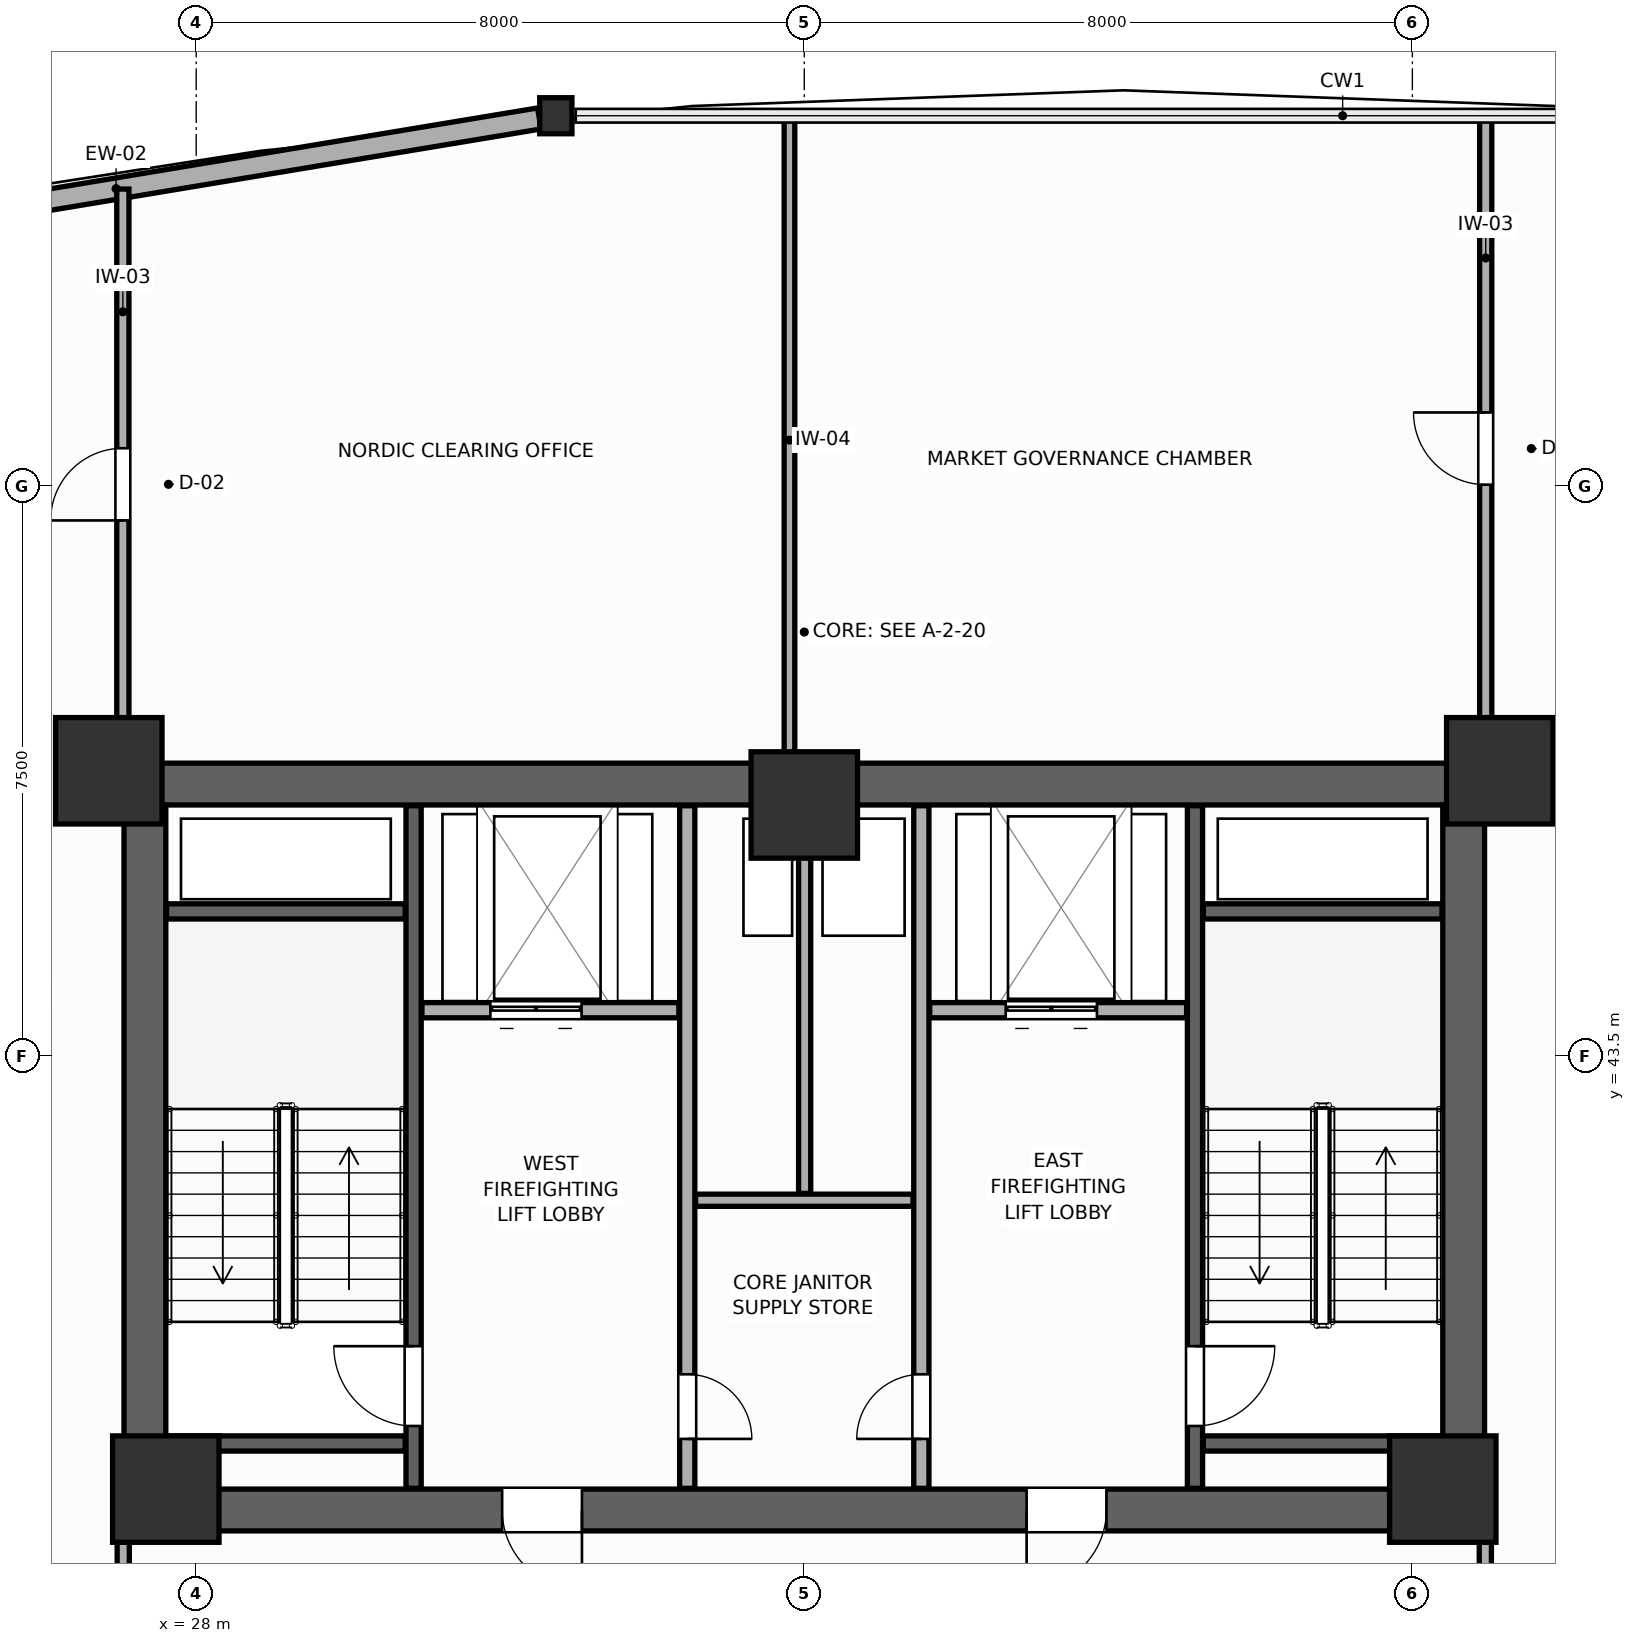
"""IFC4 building model, lengths in metres.
Left out: names, types, materials, properties, quantities, classifications, styles, units other than length and angle.
Written with IfcOpenShell. Run it as: python <this file> out.ifc"""

import sys

from ifc_helpers import new_model, si_unit, direction, frame, frame_2d, origin, origin_2d, place, context, subcontext, project, spatial, rectangle, i_section, extrude, source, transform, mapped, element, fill, save


model = new_model("IFC4")
c1 = context("Model", 3, precision=1e-05, world=origin(), true_north=direction((0.0, 1.0)))
c2 = subcontext(c1, "Body", "Model", "MODEL_VIEW")
j1 = project(units=[si_unit("LENGTHUNIT", "METRE"), si_unit("PLANEANGLEUNIT", "RADIAN")], contexts=[c1])
p1 = place(None, origin())
s1 = spatial("IfcSite", under=j1, at=p1, CompositionType="ELEMENT")
p2 = place(p1, origin())
s2 = spatial("IfcBuilding", under=s1, at=p2, CompositionType="ELEMENT")
p3 = place(p2, frame((0.0, 0.0, 75.6)))
s3 = spatial("IfcBuildingStorey", under=s2, at=p3, CompositionType="ELEMENT", Elevation=75.6)
p4 = place(p3, frame((27.05, 47.075, 0.0), z_axis=(0.0, 0.0, 1.0), x_axis=(1.0, 0.0, 0.0)))
e1 = element("IfcWall", 1, at=p4, inside=s3, PredefinedType="SHEAR", context=c2, shape_type="SweptSolid", body=[
    extrude(rectangle(XDim=17.9, YDim=0.55, at=frame_2d((8.95, 0.0))), origin(), (0.0, 0.0, 1.0), 3.9),
])
p5 = place(p3, frame((27.05, 37.525, 0.0), z_axis=(0.0, 0.0, 1.0), x_axis=(1.0, 0.0, 0.0)))
e2 = element("IfcWall", 2, at=p5, inside=s3, PredefinedType="SHEAR", context=c2, shape_type="SweptSolid", body=[
    extrude(rectangle(XDim=17.9, YDim=0.55, at=frame_2d((8.95, 0.0))), origin(), (0.0, 0.0, 1.0), 3.9),
])
p6 = place(p5, frame((4.975, 0.0, 0.0)))
e3 = element("IfcOpeningElement", 3, at=p6, cuts=e2, PredefinedType="OPENING", context=c2, shape_type="SweptSolid", body=[
    extrude(rectangle(XDim=1.05, YDim=2.1, at=frame_2d((0.525, 1.05))), frame((0.0, 0.285, 0.0), z_axis=(0.0, -1.0, 0.0), x_axis=(1.0, 0.0, 0.0)), (0.0, 0.0, 1.0), 0.57),
])
p7 = place(p5, frame((11.875, 0.0, 0.0)))
e4 = element("IfcOpeningElement", 4, at=p7, cuts=e2, PredefinedType="OPENING", context=c2, shape_type="SweptSolid", body=[
    extrude(rectangle(XDim=1.05, YDim=2.1, at=frame_2d((0.525, 1.05))), frame((0.0, 0.285, 0.0), z_axis=(0.0, -1.0, 0.0), x_axis=(1.0, 0.0, 0.0)), (0.0, 0.0, 1.0), 0.57),
])
for number, where, z_axis, x_axis in (
    (5, (27.325, 37.8, 0.0), (0.0, 0.0, 1.0), (0.0, 1.0, 0.0)),
    (6, (44.675, 37.8, 0.0), (0.0, 0.0, 1.0), (0.0, 1.0, 0.0)),
):
    element("IfcWall", number, at=place(p3, frame(where, z_axis=z_axis, x_axis=x_axis)), inside=s3, PredefinedType="SHEAR", context=c2, shape_type="SweptSolid", body=[
        extrude(rectangle(XDim=9.0, YDim=0.55, at=frame_2d((4.5, 0.0))), origin(), (0.0, 0.0, 1.0), 3.9),
    ])
m1 = source(origin(), c2, "Body", "SweptSolid", [
    extrude(rectangle(XDim=1.4, YDim=1.4, at=origin_2d()), origin(), (0.0, 0.0, 1.0), 3.9),
])
for number, where, z_axis, x_axis in (
    (7, (26.85, 47.25, 0.0), (0.0, 0.0, 1.0), (1.0, 0.0, 0.0)),
    (8, (45.15, 47.25, 0.0), (0.0, 0.0, 1.0), (1.0, 0.0, 0.0)),
    (9, (27.6, 37.8, 0.0), (0.0, 0.0, 1.0), (1.0, 0.0, 0.0)),
    (10, (44.4, 37.8, 0.0), (0.0, 0.0, 1.0), (1.0, 0.0, 0.0)),
    (11, (36.0, 46.8, 0.0), (0.0, 0.0, 1.0), (1.0, 0.0, 0.0)),
):
    element("IfcColumn", number, at=place(p3, frame(where, z_axis=z_axis, x_axis=x_axis)), inside=s3, PredefinedType="COLUMN", context=c2, shape_type="MappedRepresentation", body=[
        mapped(m1, transform((0.0, 0.0, 0.0), scale=1.0)),
    ])
m2 = source(origin(), c2, "Body", "SweptSolid", [
    extrude(i_section(OverallWidth=0.424, OverallDepth=0.474, WebThickness=0.045, FlangeThickness=0.072, FilletRadius=0.015, at=origin_2d()), origin(), (0.0, 0.0, 1.0), 3.9),
])
p8 = place(p3, frame((32.731, 55.868, 0.0), z_axis=(0.0, 0.0, 1.0), x_axis=(1.0, 0.0, 0.0)))
e12 = element("IfcColumn", 12, at=p8, inside=s3, PredefinedType="COLUMN", context=c2, shape_type="MappedRepresentation", body=[
    mapped(m2, transform((0.0, 0.0, 0.0), scale=1.0)),
])
p9 = place(p3, frame((32.514, 55.832, 0.0), z_axis=(0.0, 0.0, 1.0), x_axis=(-0.986523610756, -0.163618964122, 0.0)))
e13 = element("IfcWall", 13, at=p9, inside=s3, PredefinedType="SOLIDWALL", context=c2, shape_type="SweptSolid", body=[
    extrude(rectangle(XDim=17.258, YDim=0.28, at=frame_2d((8.629, 0.0))), origin(), (0.0, 0.0, 1.0), 3.23),
])
p10 = place(p9, frame((11.469, 0.0, 0.75)))
e14 = element("IfcOpeningElement", 14, at=p10, cuts=e13, PredefinedType="OPENING", context=c2, shape_type="SweptSolid", body=[
    extrude(rectangle(XDim=1.7, YDim=1.75, at=frame_2d((0.85, 0.875))), frame((0.0, 0.15, 0.0), z_axis=(0.0, -1.0, 0.0), x_axis=(1.0, 0.0, 0.0)), (0.0, 0.0, 1.0), 0.3),
])
p11 = place(p3, frame((30.86, 37.81, 0.0), z_axis=(0.0, 0.0, 1.0), x_axis=(0.0, 1.0, 0.0)))
e15 = element("IfcWall", 15, at=p11, inside=s3, PredefinedType="SHEAR", context=c2, shape_type="SweptSolid", body=[
    extrude(rectangle(XDim=8.98, YDim=0.2, at=frame_2d((4.49, 0.0))), origin(), (0.0, 0.0, 1.0), 3.9),
])
p12 = place(p11, frame((0.82, 0.0, 0.0)))
e16 = element("IfcOpeningElement", 16, at=p12, cuts=e15, PredefinedType="OPENING", context=c2, shape_type="SweptSolid", body=[
    extrude(rectangle(XDim=1.05, YDim=2.1, at=frame_2d((0.525, 1.05))), frame((0.0, 0.11, 0.0), z_axis=(0.0, -1.0, 0.0), x_axis=(1.0, 0.0, 0.0)), (0.0, 0.0, 1.0), 0.22),
])
for number, where, z_axis, x_axis in (
    (17, (27.61, 45.4, 0.0), (0.0, 0.0, 1.0), (1.0, 0.0, 0.0)),
    (18, (27.61, 38.4, 0.0), (0.0, 0.0, 1.0), (1.0, 0.0, 0.0)),
):
    element("IfcWall", number, at=place(p3, frame(where, z_axis=z_axis, x_axis=x_axis)), inside=s3, PredefinedType="SHEAR", context=c2, shape_type="SweptSolid", body=[
        extrude(rectangle(XDim=3.14, YDim=0.2, at=frame_2d((1.57, 0.0))), origin(), (0.0, 0.0, 1.0), 3.9),
    ])
p13 = place(p3, frame((41.14, 37.81, 0.0), z_axis=(0.0, 0.0, 1.0), x_axis=(0.0, 1.0, 0.0)))
e19 = element("IfcWall", 19, at=p13, inside=s3, PredefinedType="SHEAR", context=c2, shape_type="SweptSolid", body=[
    extrude(rectangle(XDim=8.98, YDim=0.2, at=frame_2d((4.49, 0.0))), origin(), (0.0, 0.0, 1.0), 3.9),
])
p14 = place(p13, frame((0.82, 0.0, 0.0)))
e20 = element("IfcOpeningElement", 20, at=p14, cuts=e19, PredefinedType="OPENING", context=c2, shape_type="SweptSolid", body=[
    extrude(rectangle(XDim=1.05, YDim=2.1, at=frame_2d((0.525, 1.05))), frame((0.0, 0.11, 0.0), z_axis=(0.0, -1.0, 0.0), x_axis=(1.0, 0.0, 0.0)), (0.0, 0.0, 1.0), 0.22),
])
for number, where, z_axis, x_axis in (
    (21, (41.25, 45.4, 0.0), (0.0, 0.0, 1.0), (1.0, 0.0, 0.0)),
    (22, (41.25, 38.4, 0.0), (0.0, 0.0, 1.0), (1.0, 0.0, 0.0)),
):
    element("IfcWall", number, at=place(p3, frame(where, z_axis=z_axis, x_axis=x_axis)), inside=s3, PredefinedType="SHEAR", context=c2, shape_type="SweptSolid", body=[
        extrude(rectangle(XDim=3.14, YDim=0.2, at=frame_2d((1.57, 0.0))), origin(), (0.0, 0.0, 1.0), 3.9),
    ])
p15 = place(p3, frame((30.97, 44.1, 0.0), z_axis=(0.0, 0.0, 1.0), x_axis=(1.0, 0.0, 0.0)))
e23 = element("IfcWall", 23, at=p15, inside=s3, PredefinedType="PARTITIONING", context=c2, shape_type="SweptSolid", body=[
    extrude(rectangle(XDim=3.38, YDim=0.2, at=frame_2d((1.69, 0.0))), origin(), (0.0, 0.0, 1.0), 3.68),
])
p16 = place(p15, frame((0.9, 0.0, 0.0)))
e24 = element("IfcOpeningElement", 24, at=p16, cuts=e23, PredefinedType="OPENING", context=c2, shape_type="SweptSolid", body=[
    extrude(rectangle(XDim=1.2, YDim=2.1, at=frame_2d((0.6, 1.05))), frame((0.0, 0.11, 0.0), z_axis=(0.0, -1.0, 0.0), x_axis=(1.0, 0.0, 0.0)), (0.0, 0.0, 1.0), 0.22),
])
p17 = place(p3, frame((37.65, 44.1, 0.0), z_axis=(0.0, 0.0, 1.0), x_axis=(1.0, 0.0, 0.0)))
e25 = element("IfcWall", 25, at=p17, inside=s3, PredefinedType="PARTITIONING", context=c2, shape_type="SweptSolid", body=[
    extrude(rectangle(XDim=3.38, YDim=0.2, at=frame_2d((1.69, 0.0))), origin(), (0.0, 0.0, 1.0), 3.68),
])
p18 = place(p17, frame((1.0, 0.0, 0.0)))
e26 = element("IfcOpeningElement", 26, at=p18, cuts=e25, PredefinedType="OPENING", context=c2, shape_type="SweptSolid", body=[
    extrude(rectangle(XDim=1.2, YDim=2.1, at=frame_2d((0.6, 1.05))), frame((0.0, 0.11, 0.0), z_axis=(0.0, -1.0, 0.0), x_axis=(1.0, 0.0, 0.0)), (0.0, 0.0, 1.0), 0.22),
])
p19 = place(p3, frame((34.46, 37.81, 0.0), z_axis=(0.0, 0.0, 1.0), x_axis=(0.0, 1.0, 0.0)))
e27 = element("IfcWall", 27, at=p19, inside=s3, PredefinedType="PARTITIONING", context=c2, shape_type="SweptSolid", body=[
    extrude(rectangle(XDim=8.98, YDim=0.2, at=frame_2d((4.49, 0.0))), origin(), (0.0, 0.0, 1.0), 3.68),
])
p20 = place(p19, frame((0.65, 0.0, 0.0)))
e28 = element("IfcOpeningElement", 28, at=p20, cuts=e27, PredefinedType="OPENING", context=c2, shape_type="SweptSolid", body=[
    extrude(rectangle(XDim=0.85, YDim=2.05, at=frame_2d((0.425, 1.025))), frame((0.0, 0.11, 0.0), z_axis=(0.0, -1.0, 0.0), x_axis=(1.0, 0.0, 0.0)), (0.0, 0.0, 1.0), 0.22),
])
p21 = place(p3, frame((37.54, 37.81, 0.0), z_axis=(0.0, 0.0, 1.0), x_axis=(0.0, 1.0, 0.0)))
e29 = element("IfcWall", 29, at=p21, inside=s3, PredefinedType="PARTITIONING", context=c2, shape_type="SweptSolid", body=[
    extrude(rectangle(XDim=8.98, YDim=0.2, at=frame_2d((4.49, 0.0))), origin(), (0.0, 0.0, 1.0), 3.68),
])
p22 = place(p21, frame((0.65, 0.0, 0.0)))
e30 = element("IfcOpeningElement", 30, at=p22, cuts=e29, PredefinedType="OPENING", context=c2, shape_type="SweptSolid", body=[
    extrude(rectangle(XDim=0.85, YDim=2.05, at=frame_2d((0.425, 1.025))), frame((0.0, 0.11, 0.0), z_axis=(0.0, -1.0, 0.0), x_axis=(1.0, 0.0, 0.0)), (0.0, 0.0, 1.0), 0.22),
])
p23 = place(p3, frame((34.57, 41.6, 0.0), z_axis=(0.0, 0.0, 1.0), x_axis=(1.0, 0.0, 0.0)))
e31 = element("IfcWall", 31, at=p23, inside=s3, PredefinedType="PARTITIONING", context=c2, shape_type="SweptSolid", body=[
    extrude(rectangle(XDim=2.86, YDim=0.16, at=frame_2d((1.43, 0.0))), origin(), (0.0, 0.0, 1.0), 3.68),
])
p24 = place(p3, frame((36.005, 41.69, 0.0), z_axis=(0.0, 0.0, 1.0), x_axis=(0.0, 1.0, 0.0)))
e32 = element("IfcWall", 32, at=p24, inside=s3, PredefinedType="PARTITIONING", context=c2, shape_type="SweptSolid", body=[
    extrude(rectangle(XDim=5.1, YDim=0.16, at=frame_2d((2.55, 0.0))), origin(), (0.0, 0.0, 1.0), 3.68),
])
p25 = place(p3, frame((27.04, 35.0, 0.0), z_axis=(0.0, 0.0, 1.0), x_axis=(0.0, 1.0, 0.0)))
e33 = element("IfcWall", 33, at=p25, inside=s3, PredefinedType="PARTITIONING", context=c2, shape_type="SweptSolid", body=[
    extrude(rectangle(XDim=2.65, YDim=0.16, at=frame_2d((1.325, 0.0))), origin(), (0.0, 0.0, 1.0), 3.68),
])
p26 = place(p25, frame((0.75, 0.0, 0.0)))
e34 = element("IfcOpeningElement", 34, at=p26, cuts=e33, PredefinedType="OPENING", context=c2, shape_type="SweptSolid", body=[
    extrude(rectangle(XDim=1.05, YDim=2.1, at=frame_2d((0.525, 1.05))), frame((0.0, 0.09, 0.0), z_axis=(0.0, -1.0, 0.0), x_axis=(1.0, 0.0, 0.0)), (0.0, 0.0, 1.0), 0.18),
])
p27 = place(p3, frame((44.96, 35.0, 0.0), z_axis=(0.0, 0.0, 1.0), x_axis=(0.0, 1.0, 0.0)))
e35 = element("IfcWall", 35, at=p27, inside=s3, PredefinedType="PARTITIONING", context=c2, shape_type="SweptSolid", body=[
    extrude(rectangle(XDim=2.65, YDim=0.16, at=frame_2d((1.325, 0.0))), origin(), (0.0, 0.0, 1.0), 3.68),
])
p28 = place(p27, frame((0.75, 0.0, 0.0)))
e36 = element("IfcOpeningElement", 36, at=p28, cuts=e35, PredefinedType="OPENING", context=c2, shape_type="SweptSolid", body=[
    extrude(rectangle(XDim=1.05, YDim=2.1, at=frame_2d((0.525, 1.05))), frame((0.0, 0.09, 0.0), z_axis=(0.0, -1.0, 0.0), x_axis=(1.0, 0.0, 0.0)), (0.0, 0.0, 1.0), 0.18),
])
p29 = place(p3, frame((44.965, 47.34, 0.0), z_axis=(0.0, 0.0, 1.0), x_axis=(0.0, 1.0, 0.0)))
e37 = element("IfcWall", 37, at=p29, inside=s3, PredefinedType="PARTITIONING", context=c2, shape_type="SweptSolid", body=[
    extrude(rectangle(XDim=8.508, YDim=0.16, at=frame_2d((4.254, 0.0))), origin(), (0.0, 0.0, 1.0), 3.68),
])
p30 = place(p29, frame((3.674, 0.0, 0.0)))
e38 = element("IfcOpeningElement", 38, at=p30, cuts=e37, PredefinedType="OPENING", context=c2, shape_type="SweptSolid", body=[
    extrude(rectangle(XDim=0.95, YDim=2.05, at=frame_2d((0.475, 1.025))), frame((0.0, 0.09, 0.0), z_axis=(0.0, -1.0, 0.0), x_axis=(1.0, 0.0, 0.0)), (0.0, 0.0, 1.0), 0.18),
])
p31 = place(p3, frame((27.035, 47.34, 0.0), z_axis=(0.0, 0.0, 1.0), x_axis=(0.0, 1.0, 0.0)))
e39 = element("IfcWall", 39, at=p31, inside=s3, PredefinedType="PARTITIONING", context=c2, shape_type="SweptSolid", body=[
    extrude(rectangle(XDim=7.563, YDim=0.16, at=frame_2d((3.781, 0.0))), origin(), (0.0, 0.0, 1.0), 3.68),
])
p32 = place(p31, frame((3.204, 0.0, 0.0)))
e40 = element("IfcOpeningElement", 40, at=p32, cuts=e39, PredefinedType="OPENING", context=c2, shape_type="SweptSolid", body=[
    extrude(rectangle(XDim=0.95, YDim=2.05, at=frame_2d((0.475, 1.025))), frame((0.0, 0.09, 0.0), z_axis=(0.0, -1.0, 0.0), x_axis=(1.0, 0.0, 0.0)), (0.0, 0.0, 1.0), 0.18),
])
p33 = place(p3, frame((35.805, 47.352, 0.0), z_axis=(0.0, 0.0, 1.0), x_axis=(0.0, 1.0, 0.0)))
e41 = element("IfcWall", 41, at=p33, inside=s3, PredefinedType="PARTITIONING", context=c2, shape_type="SweptSolid", body=[
    extrude(rectangle(XDim=8.496, YDim=0.14, at=frame_2d((4.248, 0.0))), origin(), (0.0, 0.0, 1.0), 3.68),
])
p34 = place(p12, origin())
e42 = element("IfcDoor", 42, at=p34, inside=s3, OperationType="SINGLE_SWING_RIGHT", PredefinedType="DOOR", context=c2, shape_type="SweptSolid", body=[
    extrude(rectangle(XDim=1.05, YDim=2.1, at=frame_2d((0.525, 1.05))), frame((0.0, 0.025, 0.0), z_axis=(0.0, -1.0, 0.0), x_axis=(1.0, 0.0, 0.0)), (0.0, 0.0, 1.0), 0.05),
])
fill(e16, e42)
p35 = place(p14, frame((1.05, 0.0, 0.0), z_axis=(0.0, 0.0, 1.0), x_axis=(-1.0, 0.0, 0.0)))
e43 = element("IfcDoor", 43, at=p35, inside=s3, OperationType="SINGLE_SWING_LEFT", PredefinedType="DOOR", context=c2, shape_type="SweptSolid", body=[
    extrude(rectangle(XDim=1.05, YDim=2.1, at=frame_2d((0.525, 1.05))), frame((0.0, 0.025, 0.0), z_axis=(0.0, -1.0, 0.0), x_axis=(1.0, 0.0, 0.0)), (0.0, 0.0, 1.0), 0.05),
])
fill(e20, e43)
p36 = place(p16, origin())
e44 = element("IfcDoor", 44, at=p36, inside=s3, OperationType="DOUBLE_DOOR_SLIDING", PredefinedType="DOOR", context=c2, shape_type="SweptSolid", body=[
    extrude(rectangle(XDim=1.2, YDim=2.1, at=frame_2d((0.6, 1.05))), frame((0.0, 0.025, 0.0), z_axis=(0.0, -1.0, 0.0), x_axis=(1.0, 0.0, 0.0)), (0.0, 0.0, 1.0), 0.05),
])
fill(e24, e44)
p37 = place(p18, origin())
e45 = element("IfcDoor", 45, at=p37, inside=s3, OperationType="DOUBLE_DOOR_SLIDING", PredefinedType="DOOR", context=c2, shape_type="SweptSolid", body=[
    extrude(rectangle(XDim=1.2, YDim=2.1, at=frame_2d((0.6, 1.05))), frame((0.0, 0.025, 0.0), z_axis=(0.0, -1.0, 0.0), x_axis=(1.0, 0.0, 0.0)), (0.0, 0.0, 1.0), 0.05),
])
fill(e26, e45)
p38 = place(p20, frame((0.85, 0.0, 0.0), z_axis=(0.0, 0.0, 1.0), x_axis=(-1.0, 0.0, 0.0)))
e46 = element("IfcDoor", 46, at=p38, inside=s3, OperationType="SINGLE_SWING_RIGHT", PredefinedType="DOOR", context=c2, shape_type="SweptSolid", body=[
    extrude(rectangle(XDim=0.85, YDim=2.05, at=frame_2d((0.425, 1.025))), frame((0.0, 0.025, 0.0), z_axis=(0.0, -1.0, 0.0), x_axis=(1.0, 0.0, 0.0)), (0.0, 0.0, 1.0), 0.05),
])
fill(e28, e46)
p39 = place(p22, origin())
e47 = element("IfcDoor", 47, at=p39, inside=s3, OperationType="SINGLE_SWING_LEFT", PredefinedType="DOOR", context=c2, shape_type="SweptSolid", body=[
    extrude(rectangle(XDim=0.85, YDim=2.05, at=frame_2d((0.425, 1.025))), frame((0.0, 0.025, 0.0), z_axis=(0.0, -1.0, 0.0), x_axis=(1.0, 0.0, 0.0)), (0.0, 0.0, 1.0), 0.05),
])
fill(e30, e47)
p40 = place(p30, origin())
e48 = element("IfcDoor", 48, at=p40, inside=s3, OperationType="SINGLE_SWING_RIGHT", PredefinedType="DOOR", context=c2, shape_type="SweptSolid", body=[
    extrude(rectangle(XDim=0.95, YDim=2.05, at=frame_2d((0.475, 1.025))), frame((0.0, 0.025, 0.0), z_axis=(0.0, -1.0, 0.0), x_axis=(1.0, 0.0, 0.0)), (0.0, 0.0, 1.0), 0.05),
])
fill(e38, e48)
p41 = place(p32, origin())
e49 = element("IfcDoor", 49, at=p41, inside=s3, OperationType="SINGLE_SWING_LEFT", PredefinedType="DOOR", context=c2, shape_type="SweptSolid", body=[
    extrude(rectangle(XDim=0.95, YDim=2.05, at=frame_2d((0.475, 1.025))), frame((0.0, 0.025, 0.0), z_axis=(0.0, -1.0, 0.0), x_axis=(1.0, 0.0, 0.0)), (0.0, 0.0, 1.0), 0.05),
])
fill(e40, e49)
p42 = place(p6, frame((1.05, 0.0, 0.0), z_axis=(0.0, 0.0, 1.0), x_axis=(-1.0, 0.0, 0.0)))
e50 = element("IfcDoor", 50, at=p42, inside=s3, OperationType="SINGLE_SWING_LEFT", PredefinedType="DOOR", context=c2, shape_type="SweptSolid", body=[
    extrude(rectangle(XDim=1.05, YDim=2.1, at=frame_2d((0.525, 1.05))), frame((0.0, 0.025, 0.0), z_axis=(0.0, -1.0, 0.0), x_axis=(1.0, 0.0, 0.0)), (0.0, 0.0, 1.0), 0.05),
])
fill(e3, e50)
p43 = place(p7, frame((1.05, 0.0, 0.0), z_axis=(0.0, 0.0, 1.0), x_axis=(-1.0, 0.0, 0.0)))
e51 = element("IfcDoor", 51, at=p43, inside=s3, OperationType="SINGLE_SWING_RIGHT", PredefinedType="DOOR", context=c2, shape_type="SweptSolid", body=[
    extrude(rectangle(XDim=1.05, YDim=2.1, at=frame_2d((0.525, 1.05))), frame((0.0, 0.025, 0.0), z_axis=(0.0, -1.0, 0.0), x_axis=(1.0, 0.0, 0.0)), (0.0, 0.0, 1.0), 0.05),
])
fill(e4, e51)
save(model, sys.argv[1])
